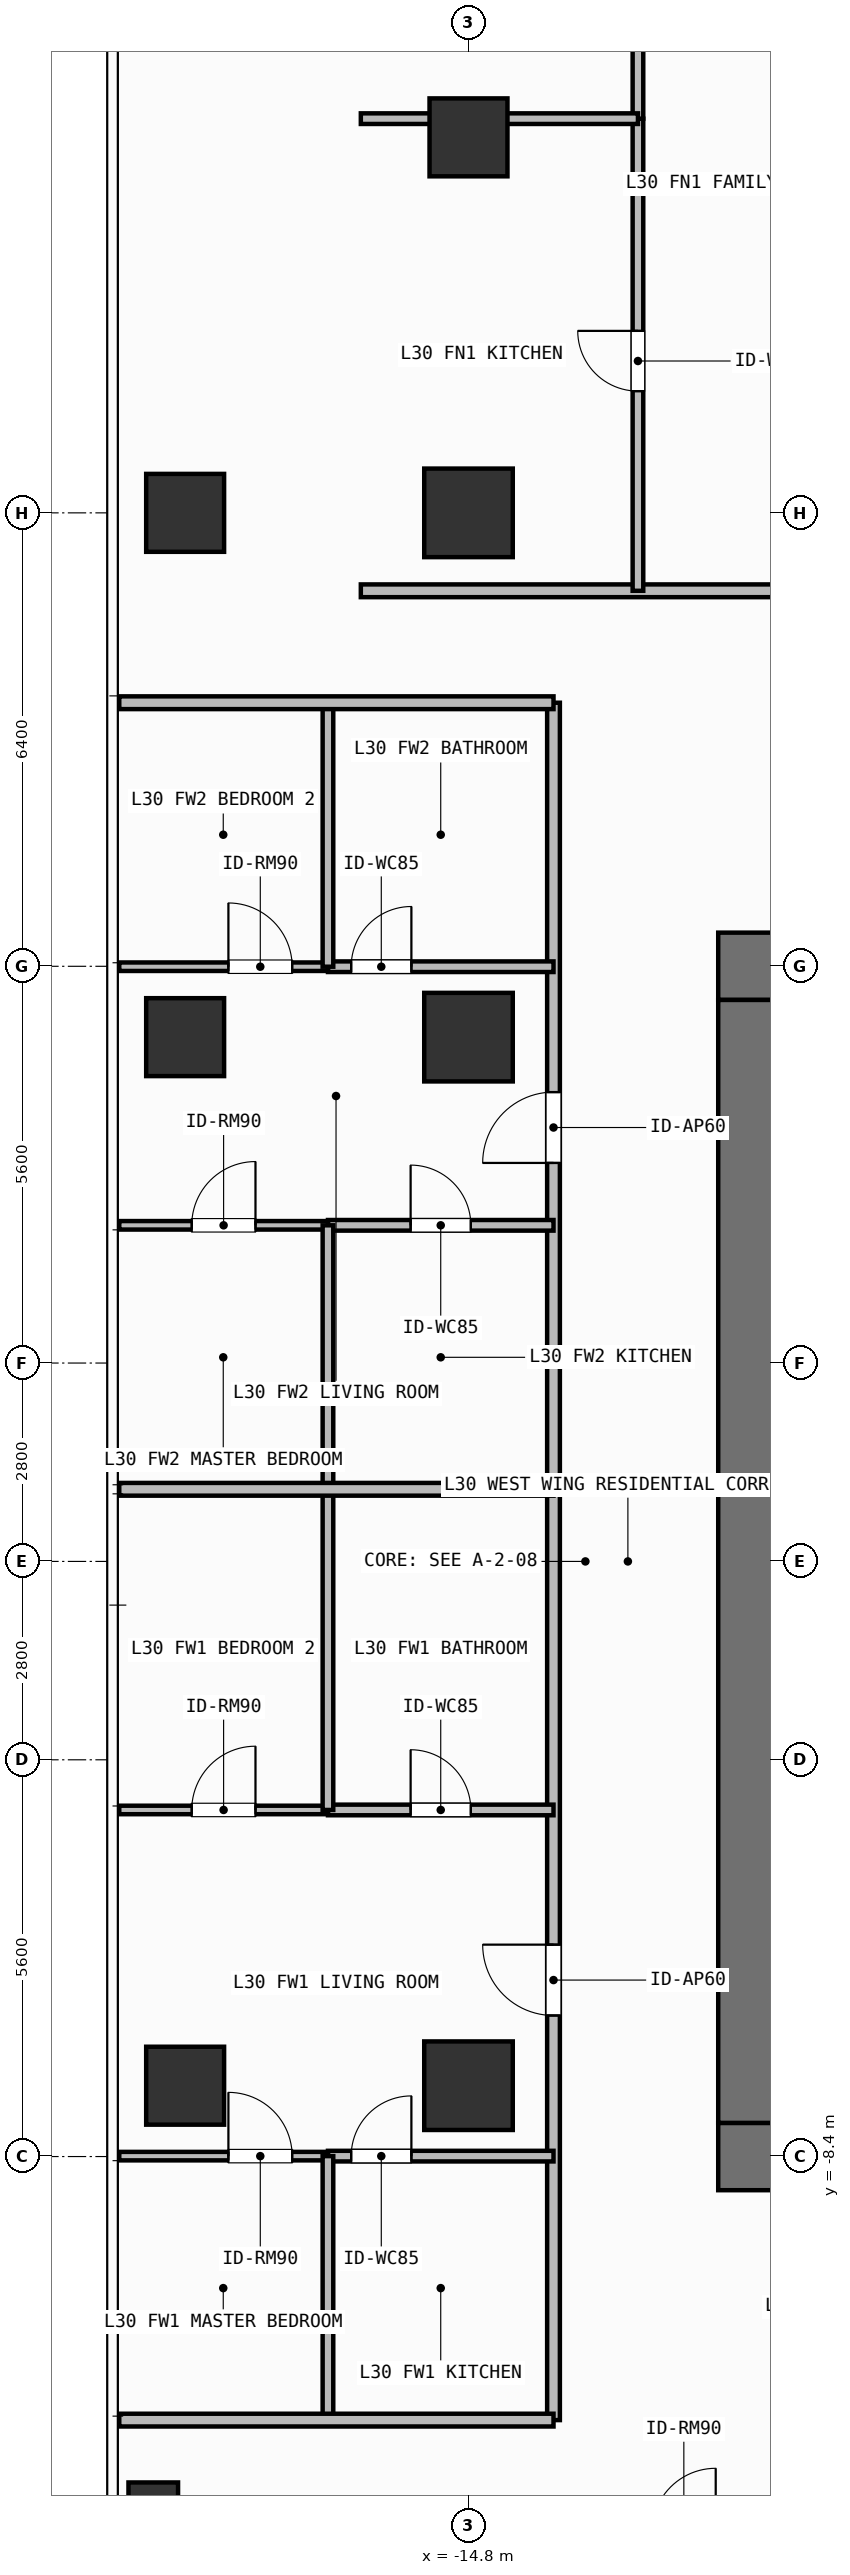
"""IFC4 building model, lengths in metres.
Left out: names, types, materials, properties, quantities, classifications, styles, units other than length and angle.
Written with IfcOpenShell. Run it as: python <this file> out.ifc"""

import sys

from ifc_helpers import new_model, si_unit, direction, frame, frame_2d, origin, origin_2d, place, context, subcontext, project, spatial, rectangle, hollow_rectangle, extrude, element, fill, save


model = new_model("IFC4")
c1 = context("Model", 3, precision=1e-05, world=origin(), true_north=direction((0.0, 1.0)))
c2 = subcontext(c1, "Body", "Model", "MODEL_VIEW")
j1 = project(units=[si_unit("LENGTHUNIT", "METRE"), si_unit("PLANEANGLEUNIT", "RADIAN")], contexts=[c1])
p1 = place(None, origin())
s1 = spatial("IfcSite", under=j1, at=p1, CompositionType="ELEMENT")
p2 = place(p1, origin())
s2 = spatial("IfcBuilding", under=s1, at=p2, CompositionType="ELEMENT")
p3 = place(p2, frame((0.0, 0.0, 121.2)))
s3 = spatial("IfcBuildingStorey", under=s2, at=p3, CompositionType="ELEMENT", Elevation=121.2)
for number, where, z_axis, x_axis in (
    (1, (-11.275, -8.4, 0.0), (0.0, 0.0, 1.0), (1.0, 0.0, 0.0)),
    (2, (-11.275, 8.4, 0.0), (0.0, 0.0, 1.0), (1.0, 0.0, 0.0)),
):
    element("IfcWall", number, at=place(p3, frame(where, z_axis=z_axis, x_axis=x_axis)), inside=s3, PredefinedType="SHEAR", context=c2, shape_type="SweptSolid", body=[
        extrude(rectangle(XDim=1.575, YDim=0.95, at=frame_2d((0.788, 0.0))), origin(), (0.0, 0.0, 1.0), 3.9),
    ])
p4 = place(p3, frame((-10.8, -7.925, 0.0), z_axis=(0.0, 0.0, 1.0), x_axis=(0.0, 1.0, 0.0)))
e3 = element("IfcWall", 3, at=p4, inside=s3, PredefinedType="SHEAR", context=c2, shape_type="SweptSolid", body=[
    extrude(rectangle(XDim=15.85, YDim=0.95, at=frame_2d((7.925, 0.0))), origin(), (0.0, 0.0, 1.0), 3.9),
])
for number, where, z_axis, x_axis in (
    (4, (-14.8, 14.8, 0.0), (0.0, 0.0, 1.0), (1.0, 0.0, 0.0)),
    (5, (-14.8, -7.4, 0.0), (0.0, 0.0, 1.0), (1.0, 0.0, 0.0)),
    (6, (-14.8, 7.4, 0.0), (0.0, 0.0, 1.0), (1.0, 0.0, 0.0)),
):
    element("IfcColumn", number, at=place(p3, frame(where, z_axis=z_axis, x_axis=x_axis)), inside=s3, PredefinedType="COLUMN", context=c2, shape_type="SweptSolid", body=[
        extrude(rectangle(XDim=1.25, YDim=1.25, at=origin_2d()), origin(), (0.0, 0.0, 1.0), 3.9),
    ])
for number, where, z_axis, x_axis in (
    (7, (-18.8, -7.4, 0.0), (0.0, 0.0, 1.0), (1.0, 0.0, 0.0)),
    (8, (-18.8, 7.4, 0.0), (0.0, 0.0, 1.0), (1.0, 0.0, 0.0)),
    (9, (-18.8, 14.8, 0.0), (0.0, 0.0, 1.0), (1.0, 0.0, 0.0)),
    (10, (-14.8, 20.1, 0.0), (0.0, 0.0, 1.0), (1.0, 0.0, 0.0)),
):
    element("IfcColumn", number, at=place(p3, frame(where, z_axis=z_axis, x_axis=x_axis)), inside=s3, PredefinedType="COLUMN", context=c2, shape_type="SweptSolid", body=[
        extrude(rectangle(XDim=1.1, YDim=1.1, at=origin_2d()), origin(), (0.0, 0.0, 1.0), 3.9),
    ])
p5 = place(p3, frame((-19.25, -13.35, 0.0), z_axis=(0.0, 0.0, 1.0), x_axis=(1.0, 0.0, 0.0)))
e11 = element("IfcColumn", 11, at=p5, inside=s3, PredefinedType="COLUMN", context=c2, shape_type="SweptSolid", body=[
    extrude(hollow_rectangle(XDim=0.7, YDim=0.7, WallThickness=0.032, at=origin_2d()), origin(), (0.0, 0.0, 1.0), 3.9),
])
p6 = place(p3, frame((-16.32, 13.7, 0.0), z_axis=(0.0, 0.0, 1.0), x_axis=(1.0, 0.0, 0.0)))
e12 = element("IfcWall", 12, at=p6, inside=s3, PredefinedType="PARTITIONING", context=c2, shape_type="SweptSolid", body=[
    extrude(rectangle(XDim=12.941, YDim=0.18, at=frame_2d((6.471, 0.0))), origin(), (0.0, 0.0, 1.0), 3.68),
])
p7 = place(p6, frame((6.417, 0.0, 0.0)))
e13 = element("IfcOpeningElement", 13, at=p7, cuts=e12, PredefinedType="OPENING", context=c2, shape_type="SweptSolid", body=[
    extrude(rectangle(XDim=1.0, YDim=2.2, at=frame_2d((0.5, 1.1))), frame((0.0, 0.1, 0.0), z_axis=(0.0, -1.0, 0.0), x_axis=(1.0, 0.0, 0.0)), (0.0, 0.0, 1.0), 0.2),
])
p8 = place(p3, frame((-12.408, 13.7, 0.0), z_axis=(0.0, 0.0, 1.0), x_axis=(0.0, 1.0, 0.0)))
e14 = element("IfcWall", 14, at=p8, inside=s3, PredefinedType="PARTITIONING", context=c2, shape_type="SweptSolid", body=[
    extrude(rectangle(XDim=6.664, YDim=0.15, at=frame_2d((3.332, 0.0))), origin(), (0.0, 0.0, 1.0), 3.68),
])
p9 = place(p8, frame((2.818, 0.0, 0.0)))
e15 = element("IfcOpeningElement", 15, at=p9, cuts=e14, PredefinedType="OPENING", context=c2, shape_type="SweptSolid", body=[
    extrude(rectangle(XDim=0.85, YDim=2.1, at=frame_2d((0.425, 1.05))), frame((0.0, 0.085, 0.0), z_axis=(0.0, -1.0, 0.0), x_axis=(1.0, 0.0, 0.0)), (0.0, 0.0, 1.0), 0.17),
])
p10 = place(p3, frame((-12.408, 20.364, 0.0), z_axis=(0.0, 0.0, 1.0), x_axis=(0.0, 1.0, 0.0)))
e16 = element("IfcWall", 16, at=p10, inside=s3, PredefinedType="PARTITIONING", context=c2, shape_type="SweptSolid", body=[
    extrude(rectangle(XDim=4.826, YDim=0.15, at=frame_2d((2.413, 0.0))), origin(), (0.0, 0.0, 1.0), 3.68),
])
p11 = place(p10, frame((1.901, 0.0, 0.0)))
e17 = element("IfcOpeningElement", 17, at=p11, cuts=e16, PredefinedType="OPENING", context=c2, shape_type="SweptSolid", body=[
    extrude(rectangle(XDim=0.85, YDim=2.1, at=frame_2d((0.425, 1.05))), frame((0.0, 0.085, 0.0), z_axis=(0.0, -1.0, 0.0), x_axis=(1.0, 0.0, 0.0)), (0.0, 0.0, 1.0), 0.17),
])
p12 = place(p3, frame((-13.6, -12.12, 0.0), z_axis=(0.0, 0.0, 1.0), x_axis=(0.0, 1.0, 0.0)))
e18 = element("IfcWall", 18, at=p12, inside=s3, PredefinedType="PARTITIONING", context=c2, shape_type="SweptSolid", body=[
    extrude(rectangle(XDim=13.138, YDim=0.18, at=frame_2d((6.569, 0.0))), origin(), (0.0, 0.0, 1.0), 3.68),
])
p13 = place(p12, frame((5.711, 0.0, 0.0)))
e19 = element("IfcOpeningElement", 19, at=p13, cuts=e18, PredefinedType="OPENING", context=c2, shape_type="SweptSolid", body=[
    extrude(rectangle(XDim=1.0, YDim=2.2, at=frame_2d((0.5, 1.1))), frame((0.0, 0.1, 0.0), z_axis=(0.0, -1.0, 0.0), x_axis=(1.0, 0.0, 0.0)), (0.0, 0.0, 1.0), 0.2),
])
p14 = place(p3, frame((-16.784, -3.508, 0.0), z_axis=(0.0, 0.0, 1.0), x_axis=(1.0, 0.0, 0.0)))
e20 = element("IfcWall", 20, at=p14, inside=s3, PredefinedType="PARTITIONING", context=c2, shape_type="SweptSolid", body=[
    extrude(rectangle(XDim=3.184, YDim=0.15, at=frame_2d((1.592, 0.0))), origin(), (0.0, 0.0, 1.0), 3.68),
])
p15 = place(p14, frame((1.167, 0.0, 0.0)))
e21 = element("IfcOpeningElement", 21, at=p15, cuts=e20, PredefinedType="OPENING", context=c2, shape_type="SweptSolid", body=[
    extrude(rectangle(XDim=0.85, YDim=2.1, at=frame_2d((0.425, 1.05))), frame((0.0, 0.085, 0.0), z_axis=(0.0, -1.0, 0.0), x_axis=(1.0, 0.0, 0.0)), (0.0, 0.0, 1.0), 0.17),
])
p16 = place(p3, frame((-16.784, -8.394, 0.0), z_axis=(0.0, 0.0, 1.0), x_axis=(1.0, 0.0, 0.0)))
e22 = element("IfcWall", 22, at=p16, inside=s3, PredefinedType="PARTITIONING", context=c2, shape_type="SweptSolid", body=[
    extrude(rectangle(XDim=3.184, YDim=0.15, at=frame_2d((1.592, 0.0))), origin(), (0.0, 0.0, 1.0), 3.68),
])
p17 = place(p16, frame((0.328, 0.0, 0.0)))
e23 = element("IfcOpeningElement", 23, at=p17, cuts=e22, PredefinedType="OPENING", context=c2, shape_type="SweptSolid", body=[
    extrude(rectangle(XDim=0.85, YDim=2.1, at=frame_2d((0.425, 1.05))), frame((0.0, 0.085, 0.0), z_axis=(0.0, -1.0, 0.0), x_axis=(1.0, 0.0, 0.0)), (0.0, 0.0, 1.0), 0.17),
])
p18 = place(p3, frame((-19.73, -8.394, 0.0), z_axis=(0.0, 0.0, 1.0), x_axis=(1.0, 0.0, 0.0)))
e24 = element("IfcWall", 24, at=p18, inside=s3, PredefinedType="PARTITIONING", context=c2, shape_type="SweptSolid", body=[
    extrude(rectangle(XDim=2.946, YDim=0.12, at=frame_2d((1.473, 0.0))), origin(), (0.0, 0.0, 1.0), 3.68),
])
p19 = place(p18, frame((1.541, 0.0, 0.0)))
e25 = element("IfcOpeningElement", 25, at=p19, cuts=e24, PredefinedType="OPENING", context=c2, shape_type="SweptSolid", body=[
    extrude(rectangle(XDim=0.9, YDim=2.1, at=frame_2d((0.45, 1.05))), frame((0.0, 0.07, 0.0), z_axis=(0.0, -1.0, 0.0), x_axis=(1.0, 0.0, 0.0)), (0.0, 0.0, 1.0), 0.14),
])
p20 = place(p3, frame((-19.73, -3.508, 0.0), z_axis=(0.0, 0.0, 1.0), x_axis=(1.0, 0.0, 0.0)))
e26 = element("IfcWall", 26, at=p20, inside=s3, PredefinedType="PARTITIONING", context=c2, shape_type="SweptSolid", body=[
    extrude(rectangle(XDim=2.946, YDim=0.12, at=frame_2d((1.473, 0.0))), origin(), (0.0, 0.0, 1.0), 3.68),
])
p21 = place(p20, frame((1.023, 0.0, 0.0)))
e27 = element("IfcOpeningElement", 27, at=p21, cuts=e26, PredefinedType="OPENING", context=c2, shape_type="SweptSolid", body=[
    extrude(rectangle(XDim=0.9, YDim=2.1, at=frame_2d((0.45, 1.05))), frame((0.0, 0.07, 0.0), z_axis=(0.0, -1.0, 0.0), x_axis=(1.0, 0.0, 0.0)), (0.0, 0.0, 1.0), 0.14),
])
p22 = place(p3, frame((-13.6, 1.018, 0.0), z_axis=(0.0, 0.0, 1.0), x_axis=(0.0, 1.0, 0.0)))
e28 = element("IfcWall", 28, at=p22, inside=s3, PredefinedType="PARTITIONING", context=c2, shape_type="SweptSolid", body=[
    extrude(rectangle(XDim=11.102, YDim=0.18, at=frame_2d((5.551, 0.0))), origin(), (0.0, 0.0, 1.0), 3.68),
])
p23 = place(p22, frame((4.606, 0.0, 0.0)))
e29 = element("IfcOpeningElement", 29, at=p23, cuts=e28, PredefinedType="OPENING", context=c2, shape_type="SweptSolid", body=[
    extrude(rectangle(XDim=1.0, YDim=2.2, at=frame_2d((0.5, 1.1))), frame((0.0, 0.1, 0.0), z_axis=(0.0, -1.0, 0.0), x_axis=(1.0, 0.0, 0.0)), (0.0, 0.0, 1.0), 0.2),
])
p24 = place(p3, frame((-16.784, 8.394, 0.0), z_axis=(0.0, 0.0, 1.0), x_axis=(1.0, 0.0, 0.0)))
e30 = element("IfcWall", 30, at=p24, inside=s3, PredefinedType="PARTITIONING", context=c2, shape_type="SweptSolid", body=[
    extrude(rectangle(XDim=3.184, YDim=0.15, at=frame_2d((1.592, 0.0))), origin(), (0.0, 0.0, 1.0), 3.68),
])
p25 = place(p24, frame((0.328, 0.0, 0.0)))
e31 = element("IfcOpeningElement", 31, at=p25, cuts=e30, PredefinedType="OPENING", context=c2, shape_type="SweptSolid", body=[
    extrude(rectangle(XDim=0.85, YDim=2.1, at=frame_2d((0.425, 1.05))), frame((0.0, 0.085, 0.0), z_axis=(0.0, -1.0, 0.0), x_axis=(1.0, 0.0, 0.0)), (0.0, 0.0, 1.0), 0.17),
])
p26 = place(p3, frame((-16.784, 4.744, 0.0), z_axis=(0.0, 0.0, 1.0), x_axis=(1.0, 0.0, 0.0)))
e32 = element("IfcWall", 32, at=p26, inside=s3, PredefinedType="PARTITIONING", context=c2, shape_type="SweptSolid", body=[
    extrude(rectangle(XDim=3.184, YDim=0.15, at=frame_2d((1.592, 0.0))), origin(), (0.0, 0.0, 1.0), 3.68),
])
p27 = place(p26, frame((1.167, 0.0, 0.0)))
e33 = element("IfcOpeningElement", 33, at=p27, cuts=e32, PredefinedType="OPENING", context=c2, shape_type="SweptSolid", body=[
    extrude(rectangle(XDim=0.85, YDim=2.1, at=frame_2d((0.425, 1.05))), frame((0.0, 0.085, 0.0), z_axis=(0.0, -1.0, 0.0), x_axis=(1.0, 0.0, 0.0)), (0.0, 0.0, 1.0), 0.17),
])
p28 = place(p3, frame((-19.73, 4.744, 0.0), z_axis=(0.0, 0.0, 1.0), x_axis=(1.0, 0.0, 0.0)))
e34 = element("IfcWall", 34, at=p28, inside=s3, PredefinedType="PARTITIONING", context=c2, shape_type="SweptSolid", body=[
    extrude(rectangle(XDim=2.946, YDim=0.12, at=frame_2d((1.473, 0.0))), origin(), (0.0, 0.0, 1.0), 3.68),
])
p29 = place(p28, frame((1.023, 0.0, 0.0)))
e35 = element("IfcOpeningElement", 35, at=p29, cuts=e34, PredefinedType="OPENING", context=c2, shape_type="SweptSolid", body=[
    extrude(rectangle(XDim=0.9, YDim=2.1, at=frame_2d((0.45, 1.05))), frame((0.0, 0.07, 0.0), z_axis=(0.0, -1.0, 0.0), x_axis=(1.0, 0.0, 0.0)), (0.0, 0.0, 1.0), 0.14),
])
p30 = place(p3, frame((-19.73, 8.394, 0.0), z_axis=(0.0, 0.0, 1.0), x_axis=(1.0, 0.0, 0.0)))
e36 = element("IfcWall", 36, at=p30, inside=s3, PredefinedType="PARTITIONING", context=c2, shape_type="SweptSolid", body=[
    extrude(rectangle(XDim=2.946, YDim=0.12, at=frame_2d((1.473, 0.0))), origin(), (0.0, 0.0, 1.0), 3.68),
])
p31 = place(p30, frame((1.541, 0.0, 0.0)))
e37 = element("IfcOpeningElement", 37, at=p31, cuts=e36, PredefinedType="OPENING", context=c2, shape_type="SweptSolid", body=[
    extrude(rectangle(XDim=0.9, YDim=2.1, at=frame_2d((0.45, 1.05))), frame((0.0, 0.07, 0.0), z_axis=(0.0, -1.0, 0.0), x_axis=(1.0, 0.0, 0.0)), (0.0, 0.0, 1.0), 0.14),
])
p32 = place(p3, frame((-16.32, 20.364, 0.0), z_axis=(0.0, 0.0, 1.0), x_axis=(1.0, 0.0, 0.0)))
e38 = element("IfcWall", 38, at=p32, inside=s3, PredefinedType="PARTITIONING", context=c2, shape_type="SweptSolid", body=[
    extrude(rectangle(XDim=3.912, YDim=0.15, at=frame_2d((1.956, 0.0))), origin(), (0.0, 0.0, 1.0), 3.082),
])
p33 = place(p3, frame((-16.784, -12.12, 0.0), z_axis=(0.0, 0.0, 1.0), x_axis=(0.0, 1.0, 0.0)))
e39 = element("IfcWall", 39, at=p33, inside=s3, PredefinedType="PARTITIONING", context=c2, shape_type="SweptSolid", body=[
    extrude(rectangle(XDim=3.726, YDim=0.15, at=frame_2d((1.863, 0.0))), origin(), (0.0, 0.0, 1.0), 3.68),
])
p34 = place(p3, frame((-16.784, -3.508, 0.0), z_axis=(0.0, 0.0, 1.0), x_axis=(0.0, 1.0, 0.0)))
e40 = element("IfcWall", 40, at=p34, inside=s3, PredefinedType="PARTITIONING", context=c2, shape_type="SweptSolid", body=[
    extrude(rectangle(XDim=4.526, YDim=0.15, at=frame_2d((2.263, 0.0))), origin(), (0.0, 0.0, 1.0), 3.68),
])
p35 = place(p3, frame((-16.784, 1.018, 0.0), z_axis=(0.0, 0.0, 1.0), x_axis=(0.0, 1.0, 0.0)))
e41 = element("IfcWall", 41, at=p35, inside=s3, PredefinedType="PARTITIONING", context=c2, shape_type="SweptSolid", body=[
    extrude(rectangle(XDim=3.726, YDim=0.15, at=frame_2d((1.863, 0.0))), origin(), (0.0, 0.0, 1.0), 3.68),
])
p36 = place(p3, frame((-16.784, 8.394, 0.0), z_axis=(0.0, 0.0, 1.0), x_axis=(0.0, 1.0, 0.0)))
e42 = element("IfcWall", 42, at=p36, inside=s3, PredefinedType="PARTITIONING", context=c2, shape_type="SweptSolid", body=[
    extrude(rectangle(XDim=3.726, YDim=0.15, at=frame_2d((1.863, 0.0))), origin(), (0.0, 0.0, 1.0), 3.68),
])
for number, where, z_axis, x_axis in (
    (43, (-19.73, 1.018, 0.0), (0.0, 0.0, 1.0), (1.0, 0.0, 0.0)),
    (44, (-19.73, -12.12, 0.0), (0.0, 0.0, 1.0), (1.0, 0.0, 0.0)),
    (45, (-19.73, 12.12, 0.0), (0.0, 0.0, 1.0), (1.0, 0.0, 0.0)),
):
    element("IfcWall", number, at=place(p3, frame(where, z_axis=z_axis, x_axis=x_axis)), inside=s3, PredefinedType="PARTITIONING", context=c2, shape_type="SweptSolid", body=[
        extrude(rectangle(XDim=6.13, YDim=0.18, at=frame_2d((3.065, 0.0))), origin(), (0.0, 0.0, 1.0), 3.68),
    ])
p37 = place(p9, origin())
e46 = element("IfcDoor", 46, at=p37, inside=s3, OperationType="SINGLE_SWING_RIGHT", PredefinedType="DOOR", context=c2, shape_type="SweptSolid", body=[
    extrude(rectangle(XDim=0.85, YDim=2.1, at=frame_2d((0.425, 1.05))), frame((0.0, 0.025, 0.0), z_axis=(0.0, -1.0, 0.0), x_axis=(1.0, 0.0, 0.0)), (0.0, 0.0, 1.0), 0.05),
])
fill(e15, e46)
p38 = place(p13, origin())
e47 = element("IfcDoor", 47, at=p38, inside=s3, OperationType="SINGLE_SWING_RIGHT", PredefinedType="DOOR", context=c2, shape_type="SweptSolid", body=[
    extrude(rectangle(XDim=1.0, YDim=2.2, at=frame_2d((0.5, 1.1))), frame((0.0, 0.025, 0.0), z_axis=(0.0, -1.0, 0.0), x_axis=(1.0, 0.0, 0.0)), (0.0, 0.0, 1.0), 0.05),
])
fill(e19, e47)
p39 = place(p15, origin())
e48 = element("IfcDoor", 48, at=p39, inside=s3, OperationType="SINGLE_SWING_LEFT", PredefinedType="DOOR", context=c2, shape_type="SweptSolid", body=[
    extrude(rectangle(XDim=0.85, YDim=2.1, at=frame_2d((0.425, 1.05))), frame((0.0, 0.025, 0.0), z_axis=(0.0, -1.0, 0.0), x_axis=(1.0, 0.0, 0.0)), (0.0, 0.0, 1.0), 0.05),
])
fill(e21, e48)
p40 = place(p17, origin())
e49 = element("IfcDoor", 49, at=p40, inside=s3, OperationType="SINGLE_SWING_RIGHT", PredefinedType="DOOR", context=c2, shape_type="SweptSolid", body=[
    extrude(rectangle(XDim=0.85, YDim=2.1, at=frame_2d((0.425, 1.05))), frame((0.0, 0.025, 0.0), z_axis=(0.0, -1.0, 0.0), x_axis=(1.0, 0.0, 0.0)), (0.0, 0.0, 1.0), 0.05),
])
fill(e23, e49)
p41 = place(p19, origin())
e50 = element("IfcDoor", 50, at=p41, inside=s3, OperationType="SINGLE_SWING_LEFT", PredefinedType="DOOR", context=c2, shape_type="SweptSolid", body=[
    extrude(rectangle(XDim=0.9, YDim=2.1, at=frame_2d((0.45, 1.05))), frame((0.0, 0.025, 0.0), z_axis=(0.0, -1.0, 0.0), x_axis=(1.0, 0.0, 0.0)), (0.0, 0.0, 1.0), 0.05),
])
fill(e25, e50)
p42 = place(p21, origin())
e51 = element("IfcDoor", 51, at=p42, inside=s3, OperationType="SINGLE_SWING_RIGHT", PredefinedType="DOOR", context=c2, shape_type="SweptSolid", body=[
    extrude(rectangle(XDim=0.9, YDim=2.1, at=frame_2d((0.45, 1.05))), frame((0.0, 0.025, 0.0), z_axis=(0.0, -1.0, 0.0), x_axis=(1.0, 0.0, 0.0)), (0.0, 0.0, 1.0), 0.05),
])
fill(e27, e51)
p43 = place(p23, origin())
e52 = element("IfcDoor", 52, at=p43, inside=s3, OperationType="SINGLE_SWING_LEFT", PredefinedType="DOOR", context=c2, shape_type="SweptSolid", body=[
    extrude(rectangle(XDim=1.0, YDim=2.2, at=frame_2d((0.5, 1.1))), frame((0.0, 0.025, 0.0), z_axis=(0.0, -1.0, 0.0), x_axis=(1.0, 0.0, 0.0)), (0.0, 0.0, 1.0), 0.05),
])
fill(e29, e52)
p44 = place(p25, origin())
e53 = element("IfcDoor", 53, at=p44, inside=s3, OperationType="SINGLE_SWING_RIGHT", PredefinedType="DOOR", context=c2, shape_type="SweptSolid", body=[
    extrude(rectangle(XDim=0.85, YDim=2.1, at=frame_2d((0.425, 1.05))), frame((0.0, 0.025, 0.0), z_axis=(0.0, -1.0, 0.0), x_axis=(1.0, 0.0, 0.0)), (0.0, 0.0, 1.0), 0.05),
])
fill(e31, e53)
p45 = place(p27, origin())
e54 = element("IfcDoor", 54, at=p45, inside=s3, OperationType="SINGLE_SWING_LEFT", PredefinedType="DOOR", context=c2, shape_type="SweptSolid", body=[
    extrude(rectangle(XDim=0.85, YDim=2.1, at=frame_2d((0.425, 1.05))), frame((0.0, 0.025, 0.0), z_axis=(0.0, -1.0, 0.0), x_axis=(1.0, 0.0, 0.0)), (0.0, 0.0, 1.0), 0.05),
])
fill(e33, e54)
p46 = place(p29, origin())
e55 = element("IfcDoor", 55, at=p46, inside=s3, OperationType="SINGLE_SWING_RIGHT", PredefinedType="DOOR", context=c2, shape_type="SweptSolid", body=[
    extrude(rectangle(XDim=0.9, YDim=2.1, at=frame_2d((0.45, 1.05))), frame((0.0, 0.025, 0.0), z_axis=(0.0, -1.0, 0.0), x_axis=(1.0, 0.0, 0.0)), (0.0, 0.0, 1.0), 0.05),
])
fill(e35, e55)
p47 = place(p31, origin())
e56 = element("IfcDoor", 56, at=p47, inside=s3, OperationType="SINGLE_SWING_LEFT", PredefinedType="DOOR", context=c2, shape_type="SweptSolid", body=[
    extrude(rectangle(XDim=0.9, YDim=2.1, at=frame_2d((0.45, 1.05))), frame((0.0, 0.025, 0.0), z_axis=(0.0, -1.0, 0.0), x_axis=(1.0, 0.0, 0.0)), (0.0, 0.0, 1.0), 0.05),
])
fill(e37, e56)
save(model, sys.argv[1])
